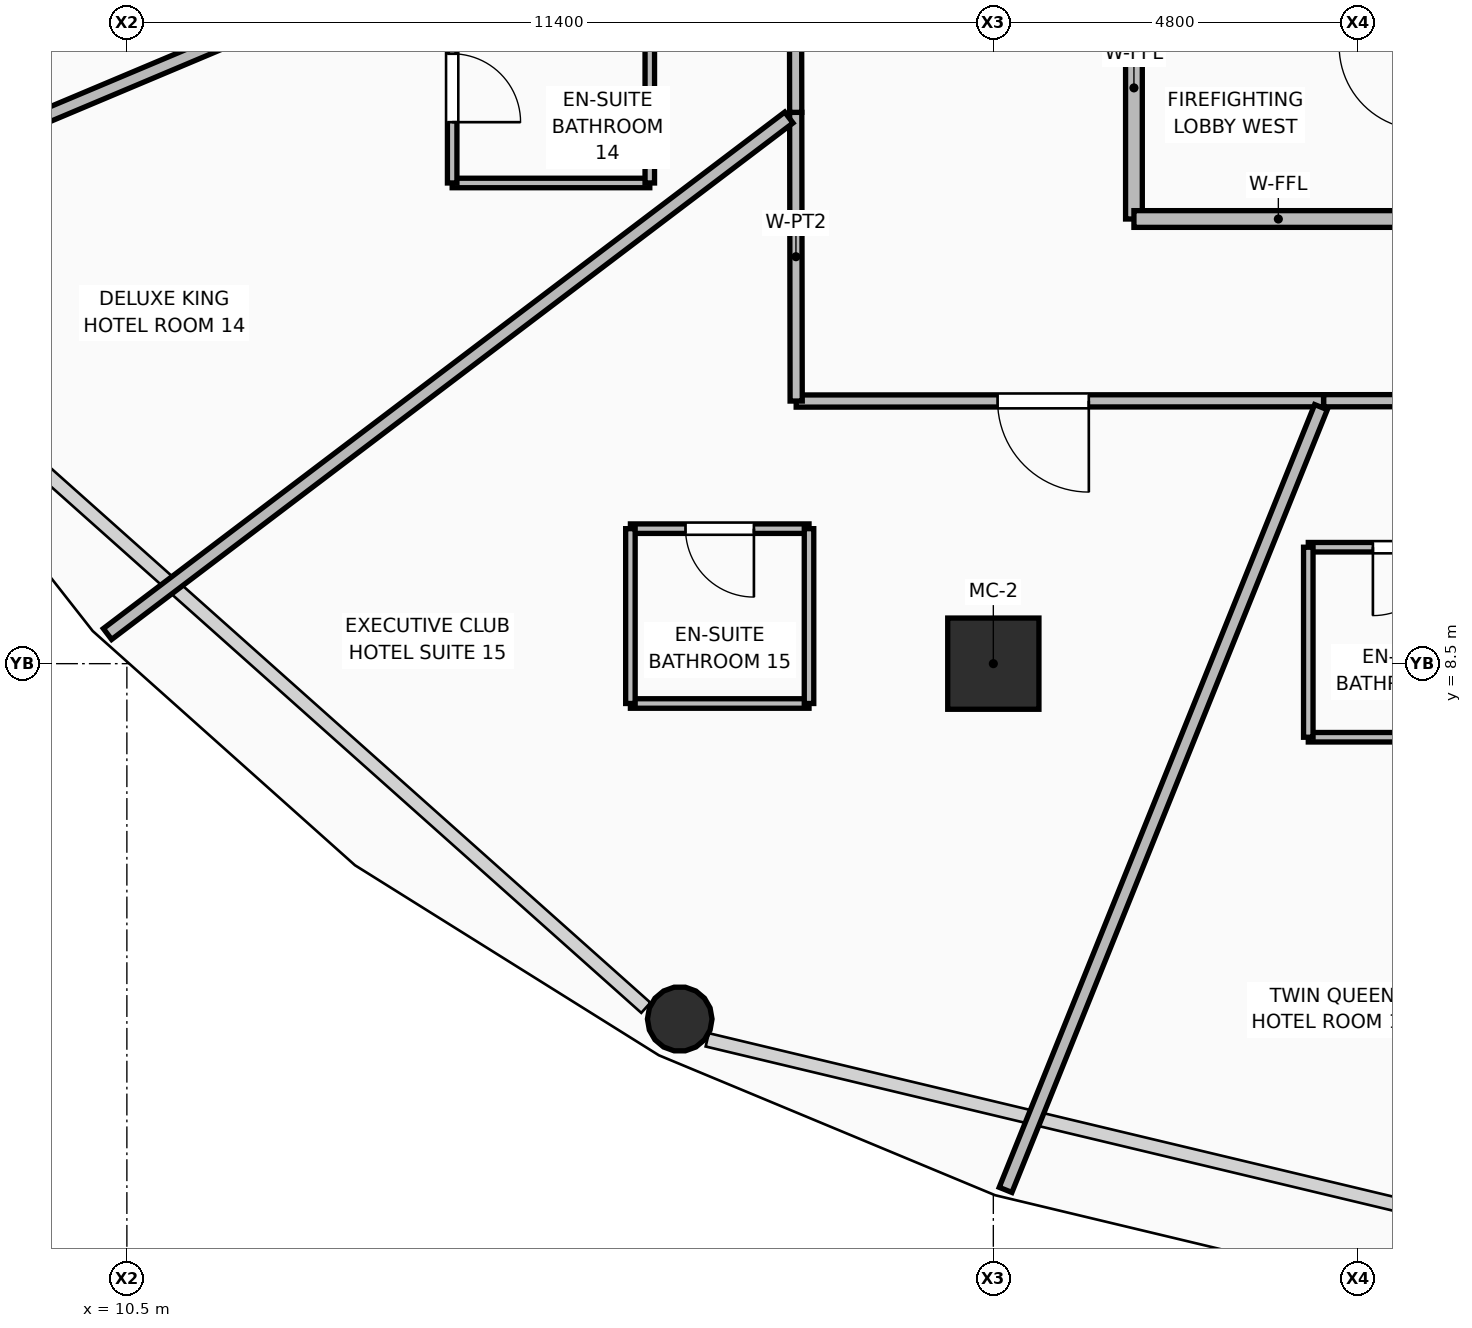
"""IFC4 building model, lengths in metres.
Left out: names, types, materials, properties, quantities, classifications, styles, units other than length and angle.
Written with IfcOpenShell. Run it as: python <this file> out.ifc"""

import sys

from ifc_helpers import new_model, si_unit, direction, frame, frame_2d, origin, origin_2d, place, context, subcontext, project, spatial, rectangle, hollow_rectangle, hollow_circle, extrude, element, fill, save


model = new_model("IFC4")
c1 = context("Model", 3, precision=1e-05, world=origin(), true_north=direction((0.0, 1.0)))
c2 = subcontext(c1, "Body", "Model", "MODEL_VIEW")
j1 = project(units=[si_unit("LENGTHUNIT", "METRE"), si_unit("PLANEANGLEUNIT", "RADIAN")], contexts=[c1])
p1 = place(None, origin())
s1 = spatial("IfcSite", under=j1, at=p1, CompositionType="ELEMENT")
p2 = place(p1, origin())
s2 = spatial("IfcBuilding", under=s1, at=p2, CompositionType="ELEMENT")
p3 = place(p2, frame((0.0, 0.0, 64.5)))
s3 = spatial("IfcBuildingStorey", under=s2, at=p3, CompositionType="ELEMENT", Elevation=64.5)
p4 = place(p3, frame((21.9, 8.5, 0.0), z_axis=(0.0, 0.0, 1.0), x_axis=(1.0, 0.0, 0.0)))
e1 = element("IfcColumn", 1, at=p4, inside=s3, PredefinedType="COLUMN", context=c2, shape_type="SweptSolid", body=[
    extrude(hollow_rectangle(XDim=1.2, YDim=1.2, WallThickness=0.045, at=origin_2d()), origin(), (0.0, 0.0, 1.0), 3.75),
])
p5 = place(p3, frame((17.774, 3.825, 0.0), z_axis=(-0.027659758927, -0.043094587365, 0.998688036514), x_axis=(0.841568257174, -0.540150783131, 0.0)))
e2 = element("IfcColumn", 2, at=p5, inside=s3, PredefinedType="COLUMN", context=c2, shape_type="SweptSolid", body=[
    extrude(hollow_circle(Radius=0.425, WallThickness=0.04, at=origin_2d()), origin(), (0.0, 0.0, 1.0), 3.575),
])
p6 = place(p3, frame((23.75, 14.35, 0.0), z_axis=(0.0, 0.0, 1.0), x_axis=(0.0, 1.0, 0.0)))
e3 = element("IfcWall", 3, at=p6, inside=s3, PredefinedType="PARTITIONING", context=c2, shape_type="SweptSolid", body=[
    extrude(rectangle(XDim=3.45, YDim=0.22, at=frame_2d((1.725, 0.0))), origin(), (0.0, 0.0, 1.0), 2.928),
])
p7 = place(p3, frame((23.75, 14.35, 0.0), z_axis=(0.0, 0.0, 1.0), x_axis=(1.0, 0.0, 0.0)))
e4 = element("IfcWall", 4, at=p7, inside=s3, PredefinedType="PARTITIONING", context=c2, shape_type="SweptSolid", body=[
    extrude(rectangle(XDim=3.8, YDim=0.22, at=frame_2d((1.9, 0.0))), origin(), (0.0, 0.0, 1.0), 3.55),
])
p8 = place(p3, frame((30.237, 11.962, 0.0), z_axis=(0.0, 0.0, 1.0), x_axis=(-0.999999730695, -0.00073389987, 0.0)))
e5 = element("IfcWall", 5, at=p8, inside=s3, PredefinedType="PARTITIONING", context=c2, shape_type="SweptSolid", body=[
    extrude(rectangle(XDim=3.992, YDim=0.16, at=frame_2d((1.996, 0.0))), origin(), (0.0, 0.0, 1.0), 3.55),
])
p9 = place(p8, frame((1.496, 0.0, 0.0)))
e6 = element("IfcOpeningElement", 6, at=p9, cuts=e5, PredefinedType="OPENING", context=c2, shape_type="SweptSolid", body=[
    extrude(rectangle(XDim=1.0, YDim=2.1, at=frame_2d((0.5, 1.05))), frame((0.0, 0.09, 0.0), z_axis=(0.0, -1.0, 0.0), x_axis=(1.0, 0.0, 0.0)), (0.0, 0.0, 1.0), 0.18),
])
p10 = place(p3, frame((26.245, 11.959, 0.0), z_axis=(0.0, 0.0, 1.0), x_axis=(-0.999999841558, -0.000562924303, 0.0)))
e7 = element("IfcWall", 7, at=p10, inside=s3, PredefinedType="PARTITIONING", context=c2, shape_type="SweptSolid", body=[
    extrude(rectangle(XDim=6.939, YDim=0.16, at=frame_2d((3.47, 0.0))), origin(), (0.0, 0.0, 1.0), 2.928),
])
p11 = place(p10, frame((3.089, 0.0, 0.0)))
e8 = element("IfcOpeningElement", 8, at=p11, cuts=e7, PredefinedType="OPENING", context=c2, shape_type="SweptSolid", body=[
    extrude(rectangle(XDim=1.2, YDim=2.1, at=frame_2d((0.6, 1.05))), frame((0.0, 0.09, 0.0), z_axis=(0.0, -1.0, 0.0), x_axis=(1.0, 0.0, 0.0)), (0.0, 0.0, 1.0), 0.18),
])
p12 = place(p3, frame((19.306, 11.955, 0.0), z_axis=(0.0, 0.0, 1.0), x_axis=(-0.001542811226, 0.999998809866, 0.0)))
e9 = element("IfcWall", 9, at=p12, inside=s3, PredefinedType="PARTITIONING", context=c2, shape_type="SweptSolid", body=[
    extrude(rectangle(XDim=3.798, YDim=0.16, at=frame_2d((1.899, 0.0))), origin(), (0.0, 0.0, 1.0), 3.55),
])
p13 = place(p3, frame((19.3, 15.753, 0.0), z_axis=(0.0, 0.0, 1.0), x_axis=(-0.001724750617, 0.999998512617, 0.0)))
e10 = element("IfcWall", 10, at=p13, inside=s3, PredefinedType="PARTITIONING", context=c2, shape_type="SweptSolid", body=[
    extrude(rectangle(XDim=4.105, YDim=0.16, at=frame_2d((2.052, 0.0))), origin(), (0.0, 0.0, 1.0), 2.928),
])
p14 = place(p13, frame((2.505, 0.0, 0.0)))
e11 = element("IfcOpeningElement", 11, at=p14, cuts=e10, PredefinedType="OPENING", context=c2, shape_type="SweptSolid", body=[
    extrude(rectangle(XDim=1.0, YDim=2.1, at=frame_2d((0.5, 1.05))), frame((0.0, 0.09, 0.0), z_axis=(0.0, -1.0, 0.0), x_axis=(1.0, 0.0, 0.0)), (0.0, 0.0, 1.0), 0.18),
])
p15 = place(p3, frame((19.21, 19.823, 0.0), z_axis=(0.0, 0.0, 1.0), x_axis=(-0.921607348109, -0.388123557533, 0.0)))
e12 = element("IfcWall", 12, at=p15, inside=s3, PredefinedType="PARTITIONING", context=c2, shape_type="SweptSolid", body=[
    extrude(rectangle(XDim=13.939, YDim=0.18, at=frame_2d((6.969, 0.0))), origin(), (0.0, 0.0, 1.0), 2.775),
])
p16 = place(p3, frame((19.21, 15.685, 0.0), z_axis=(0.0, 0.0, 1.0), x_axis=(-0.796937326032, -0.604061998786, 0.0)))
e13 = element("IfcWall", 13, at=p16, inside=s3, PredefinedType="PARTITIONING", context=c2, shape_type="SweptSolid", body=[
    extrude(rectangle(XDim=11.249, YDim=0.18, at=frame_2d((5.625, 0.0))), origin(), (0.0, 0.0, 1.0), 2.775),
])
p17 = place(p3, frame((26.211, 11.875, 0.0), z_axis=(0.0, 0.0, 1.0), x_axis=(-0.373770341631, -0.9275212837, 0.0)))
e14 = element("IfcWall", 14, at=p17, inside=s3, PredefinedType="PARTITIONING", context=c2, shape_type="SweptSolid", body=[
    extrude(rectangle(XDim=11.103, YDim=0.18, at=frame_2d((5.551, 0.0))), origin(), (0.0, 0.0, 1.0), 2.775),
])
p18 = place(p3, frame((14.78, 14.824, 0.0), z_axis=(0.0, 0.0, 1.0), x_axis=(1.0, 0.0, 0.0)))
e15 = element("IfcWall", 15, at=p18, inside=s3, PredefinedType="PARTITIONING", context=c2, shape_type="SweptSolid", body=[
    extrude(rectangle(XDim=2.6, YDim=0.125, at=frame_2d((1.3, 0.0))), origin(), (0.0, 0.0, 1.0), 3.55),
])
p19 = place(p3, frame((14.78, 14.824, 0.0), z_axis=(0.0, 0.0, 1.0), x_axis=(0.0, 1.0, 0.0)))
e16 = element("IfcWall", 16, at=p19, inside=s3, PredefinedType="PARTITIONING", context=c2, shape_type="SweptSolid", body=[
    extrude(rectangle(XDim=2.5, YDim=0.125, at=frame_2d((1.25, 0.0))), origin(), (0.0, 0.0, 1.0), 2.928),
])
p20 = place(p19, frame((0.8, 0.0, 0.0)))
e17 = element("IfcOpeningElement", 17, at=p20, cuts=e16, PredefinedType="OPENING", context=c2, shape_type="SweptSolid", body=[
    extrude(rectangle(XDim=0.9, YDim=2.1, at=frame_2d((0.45, 1.05))), frame((0.0, 0.073, 0.0), z_axis=(0.0, -1.0, 0.0), x_axis=(1.0, 0.0, 0.0)), (0.0, 0.0, 1.0), 0.145),
])
p21 = place(p3, frame((17.38, 14.824, 0.0), z_axis=(0.0, 0.0, 1.0), x_axis=(0.0, 1.0, 0.0)))
e18 = element("IfcWall", 18, at=p21, inside=s3, PredefinedType="PARTITIONING", context=c2, shape_type="SweptSolid", body=[
    extrude(rectangle(XDim=2.5, YDim=0.125, at=frame_2d((1.25, 0.0))), origin(), (0.0, 0.0, 1.0), 2.928),
])
p22 = place(p3, frame((17.125, 7.976, 0.0), z_axis=(0.0, 0.0, 1.0), x_axis=(1.0, 0.0, 0.0)))
e19 = element("IfcWall", 19, at=p22, inside=s3, PredefinedType="PARTITIONING", context=c2, shape_type="SweptSolid", body=[
    extrude(rectangle(XDim=2.35, YDim=0.125, at=frame_2d((1.175, 0.0))), origin(), (0.0, 0.0, 1.0), 2.928),
])
p23 = place(p3, frame((17.125, 10.276, 0.0), z_axis=(0.0, 0.0, 1.0), x_axis=(1.0, 0.0, 0.0)))
e20 = element("IfcWall", 20, at=p23, inside=s3, PredefinedType="PARTITIONING", context=c2, shape_type="SweptSolid", body=[
    extrude(rectangle(XDim=2.35, YDim=0.125, at=frame_2d((1.175, 0.0))), origin(), (0.0, 0.0, 1.0), 2.928),
])
p24 = place(p23, frame((0.725, 0.0, 0.0)))
e21 = element("IfcOpeningElement", 21, at=p24, cuts=e20, PredefinedType="OPENING", context=c2, shape_type="SweptSolid", body=[
    extrude(rectangle(XDim=0.9, YDim=2.1, at=frame_2d((0.45, 1.05))), frame((0.0, 0.073, 0.0), z_axis=(0.0, -1.0, 0.0), x_axis=(1.0, 0.0, 0.0)), (0.0, 0.0, 1.0), 0.145),
])
p25 = place(p3, frame((17.125, 7.976, 0.0), z_axis=(0.0, 0.0, 1.0), x_axis=(0.0, 1.0, 0.0)))
e22 = element("IfcWall", 22, at=p25, inside=s3, PredefinedType="PARTITIONING", context=c2, shape_type="SweptSolid", body=[
    extrude(rectangle(XDim=2.3, YDim=0.125, at=frame_2d((1.15, 0.0))), origin(), (0.0, 0.0, 1.0), 3.55),
])
p26 = place(p3, frame((19.475, 7.976, 0.0), z_axis=(0.0, 0.0, 1.0), x_axis=(0.0, 1.0, 0.0)))
e23 = element("IfcWall", 23, at=p26, inside=s3, PredefinedType="PARTITIONING", context=c2, shape_type="SweptSolid", body=[
    extrude(rectangle(XDim=2.3, YDim=0.125, at=frame_2d((1.15, 0.0))), origin(), (0.0, 0.0, 1.0), 2.928),
])
p27 = place(p3, frame((26.044, 7.532, 0.0), z_axis=(0.0, 0.0, 1.0), x_axis=(1.0, 0.0, 0.0)))
e24 = element("IfcWall", 24, at=p27, inside=s3, PredefinedType="PARTITIONING", context=c2, shape_type="SweptSolid", body=[
    extrude(rectangle(XDim=2.6, YDim=0.125, at=frame_2d((1.3, 0.0))), origin(), (0.0, 0.0, 1.0), 3.55),
])
p28 = place(p3, frame((26.044, 10.032, 0.0), z_axis=(0.0, 0.0, 1.0), x_axis=(1.0, 0.0, 0.0)))
e25 = element("IfcWall", 25, at=p28, inside=s3, PredefinedType="PARTITIONING", context=c2, shape_type="SweptSolid", body=[
    extrude(rectangle(XDim=2.6, YDim=0.125, at=frame_2d((1.3, 0.0))), origin(), (0.0, 0.0, 1.0), 3.55),
])
p29 = place(p28, frame((0.85, 0.0, 0.0)))
e26 = element("IfcOpeningElement", 26, at=p29, cuts=e25, PredefinedType="OPENING", context=c2, shape_type="SweptSolid", body=[
    extrude(rectangle(XDim=0.9, YDim=2.1, at=frame_2d((0.45, 1.05))), frame((0.0, 0.073, 0.0), z_axis=(0.0, -1.0, 0.0), x_axis=(1.0, 0.0, 0.0)), (0.0, 0.0, 1.0), 0.145),
])
p30 = place(p3, frame((26.044, 7.532, 0.0), z_axis=(0.0, 0.0, 1.0), x_axis=(0.0, 1.0, 0.0)))
e27 = element("IfcWall", 27, at=p30, inside=s3, PredefinedType="PARTITIONING", context=c2, shape_type="SweptSolid", body=[
    extrude(rectangle(XDim=2.5, YDim=0.125, at=frame_2d((1.25, 0.0))), origin(), (0.0, 0.0, 1.0), 3.55),
])
p31 = place(p20, frame((0.9, 0.0, 0.0), z_axis=(0.0, 0.0, 1.0), x_axis=(-1.0, 0.0, 0.0)))
e28 = element("IfcDoor", 28, at=p31, inside=s3, OperationType="SINGLE_SWING_RIGHT", PredefinedType="DOOR", context=c2, shape_type="SweptSolid", body=[
    extrude(rectangle(XDim=0.9, YDim=2.1, at=frame_2d((0.45, 1.05))), frame((0.0, 0.025, 0.0), z_axis=(0.0, -1.0, 0.0), x_axis=(1.0, 0.0, 0.0)), (0.0, 0.0, 1.0), 0.05),
])
fill(e17, e28)
p32 = place(p24, frame((0.9, 0.0, 0.0), z_axis=(0.0, 0.0, 1.0), x_axis=(-1.0, 0.0, 0.0)))
e29 = element("IfcDoor", 29, at=p32, inside=s3, OperationType="SINGLE_SWING_LEFT", PredefinedType="DOOR", context=c2, shape_type="SweptSolid", body=[
    extrude(rectangle(XDim=0.9, YDim=2.1, at=frame_2d((0.45, 1.05))), frame((0.0, 0.025, 0.0), z_axis=(0.0, -1.0, 0.0), x_axis=(1.0, 0.0, 0.0)), (0.0, 0.0, 1.0), 0.05),
])
fill(e21, e29)
p33 = place(p11, origin())
e30 = element("IfcDoor", 30, at=p33, inside=s3, OperationType="SINGLE_SWING_LEFT", PredefinedType="DOOR", context=c2, shape_type="SweptSolid", body=[
    extrude(rectangle(XDim=1.2, YDim=2.1, at=frame_2d((0.6, 1.05))), frame((0.0, 0.025, 0.0), z_axis=(0.0, -1.0, 0.0), x_axis=(1.0, 0.0, 0.0)), (0.0, 0.0, 1.0), 0.05),
])
fill(e8, e30)
p34 = place(p29, frame((0.9, 0.0, 0.0), z_axis=(0.0, 0.0, 1.0), x_axis=(-1.0, 0.0, 0.0)))
e31 = element("IfcDoor", 31, at=p34, inside=s3, OperationType="SINGLE_SWING_RIGHT", PredefinedType="DOOR", context=c2, shape_type="SweptSolid", body=[
    extrude(rectangle(XDim=0.9, YDim=2.1, at=frame_2d((0.45, 1.05))), frame((0.0, 0.025, 0.0), z_axis=(0.0, -1.0, 0.0), x_axis=(1.0, 0.0, 0.0)), (0.0, 0.0, 1.0), 0.05),
])
fill(e26, e31)
save(model, sys.argv[1])
